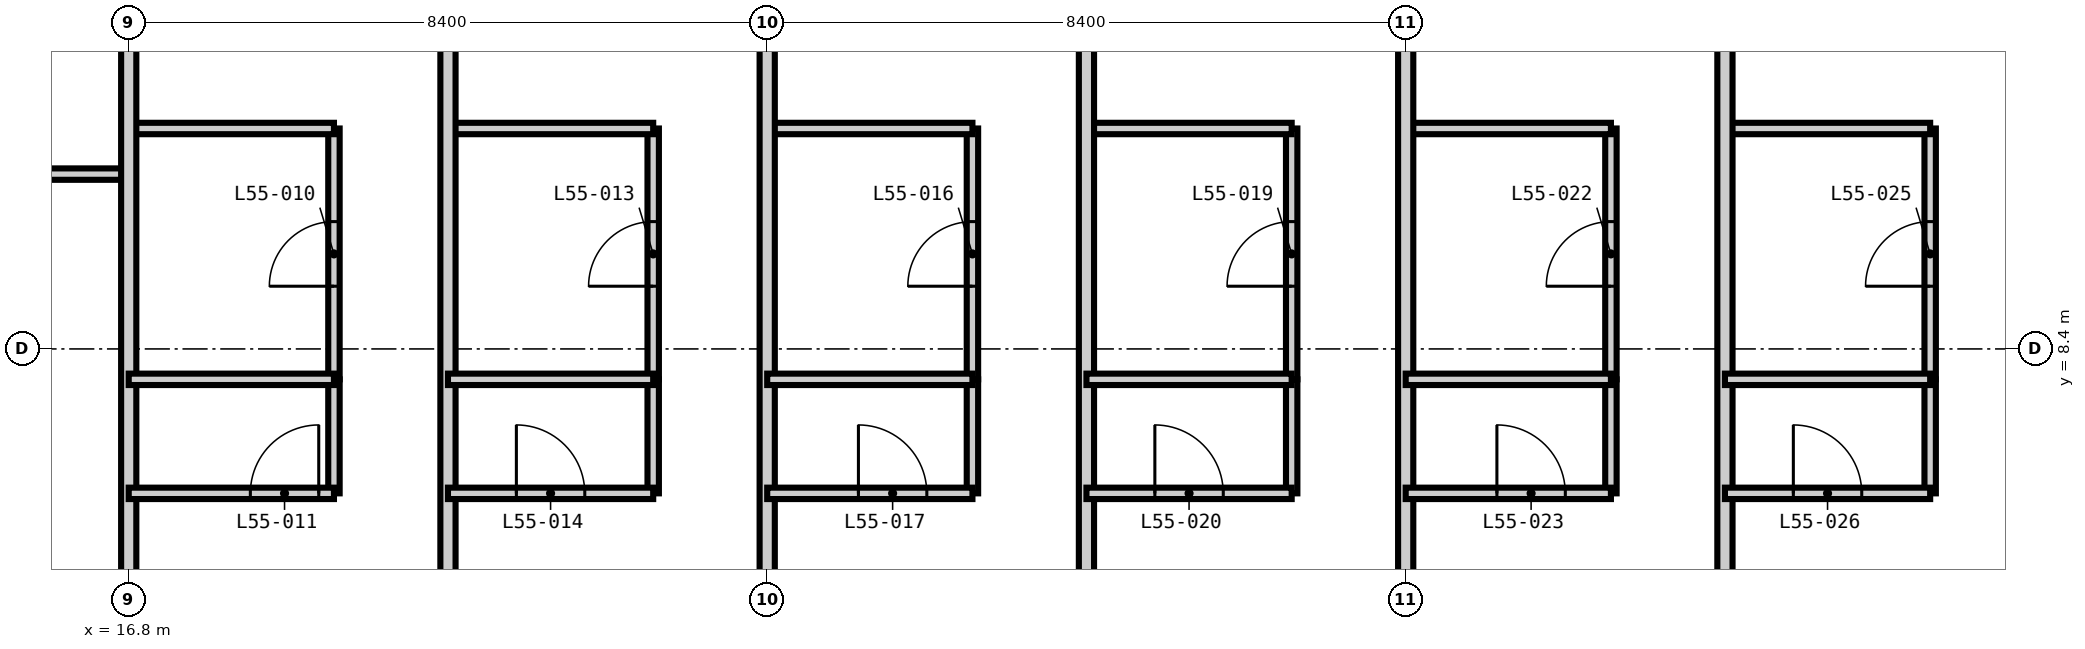
"""IFC4 building model, lengths in metres.
Left out: names, types, materials, properties, quantities, classifications, styles, units other than length and angle.
Written with IfcOpenShell. Run it as: python <this file> out.ifc"""

import sys

from ifc_helpers import new_model, si_unit, direction, frame, frame_2d, origin, place, context, subcontext, project, spatial, rectangle, extrude, element, fill, save


model = new_model("IFC4")
c1 = context("Model", 3, precision=1e-05, world=origin(), true_north=direction((0.0, 1.0)))
c2 = subcontext(c1, "Body", "Model", "MODEL_VIEW")
j1 = project(units=[si_unit("LENGTHUNIT", "METRE"), si_unit("PLANEANGLEUNIT", "RADIAN")], contexts=[c1])
p1 = place(None, origin())
s1 = spatial("IfcSite", under=j1, at=p1, CompositionType="ELEMENT")
p2 = place(p1, origin())
s2 = spatial("IfcBuilding", under=s1, at=p2, CompositionType="ELEMENT")
p3 = place(p2, frame((0.0, 0.0, 213.0)))
s3 = spatial("IfcBuildingStorey", under=s2, at=p3, CompositionType="ELEMENT", Elevation=213.0)
p4 = place(p3, frame((19.5, 8.0, 0.0), z_axis=(0.0, 0.0, 1.0), x_axis=(0.0, 1.0, 0.0)))
e1 = element("IfcWall", 1, at=p4, inside=s3, PredefinedType="PARTITIONING", context=c2, shape_type="SweptSolid", body=[
    extrude(rectangle(XDim=3.3, YDim=0.15, at=frame_2d((1.65, 0.0))), origin(), (0.0, 0.0, 1.0), 3.25),
])
p5 = place(p4, frame((1.225, 0.0, 0.0)))
e2 = element("IfcOpeningElement", 2, at=p5, cuts=e1, PredefinedType="OPENING", context=c2, shape_type="SweptSolid", body=[
    extrude(rectangle(XDim=0.85, YDim=2.1, at=frame_2d((0.425, 1.05))), frame((0.0, 0.085, 0.0), z_axis=(0.0, -1.0, 0.0), x_axis=(1.0, 0.0, 0.0)), (0.0, 0.0, 1.0), 0.17),
])
p6 = place(p3, frame((23.7, 8.0, 0.0), z_axis=(0.0, 0.0, 1.0), x_axis=(0.0, 1.0, 0.0)))
e3 = element("IfcWall", 3, at=p6, inside=s3, PredefinedType="PARTITIONING", context=c2, shape_type="SweptSolid", body=[
    extrude(rectangle(XDim=3.3, YDim=0.15, at=frame_2d((1.65, 0.0))), origin(), (0.0, 0.0, 1.0), 3.25),
])
p7 = place(p6, frame((1.225, 0.0, 0.0)))
e4 = element("IfcOpeningElement", 4, at=p7, cuts=e3, PredefinedType="OPENING", context=c2, shape_type="SweptSolid", body=[
    extrude(rectangle(XDim=0.85, YDim=2.1, at=frame_2d((0.425, 1.05))), frame((0.0, 0.085, 0.0), z_axis=(0.0, -1.0, 0.0), x_axis=(1.0, 0.0, 0.0)), (0.0, 0.0, 1.0), 0.17),
])
p8 = place(p3, frame((27.9, 8.0, 0.0), z_axis=(0.0, 0.0, 1.0), x_axis=(0.0, 1.0, 0.0)))
e5 = element("IfcWall", 5, at=p8, inside=s3, PredefinedType="PARTITIONING", context=c2, shape_type="SweptSolid", body=[
    extrude(rectangle(XDim=3.3, YDim=0.15, at=frame_2d((1.65, 0.0))), origin(), (0.0, 0.0, 1.0), 3.25),
])
p9 = place(p8, frame((1.225, 0.0, 0.0)))
e6 = element("IfcOpeningElement", 6, at=p9, cuts=e5, PredefinedType="OPENING", context=c2, shape_type="SweptSolid", body=[
    extrude(rectangle(XDim=0.85, YDim=2.1, at=frame_2d((0.425, 1.05))), frame((0.0, 0.085, 0.0), z_axis=(0.0, -1.0, 0.0), x_axis=(1.0, 0.0, 0.0)), (0.0, 0.0, 1.0), 0.17),
])
p10 = place(p3, frame((32.1, 8.0, 0.0), z_axis=(0.0, 0.0, 1.0), x_axis=(0.0, 1.0, 0.0)))
e7 = element("IfcWall", 7, at=p10, inside=s3, PredefinedType="PARTITIONING", context=c2, shape_type="SweptSolid", body=[
    extrude(rectangle(XDim=3.3, YDim=0.15, at=frame_2d((1.65, 0.0))), origin(), (0.0, 0.0, 1.0), 3.25),
])
p11 = place(p10, frame((1.225, 0.0, 0.0)))
e8 = element("IfcOpeningElement", 8, at=p11, cuts=e7, PredefinedType="OPENING", context=c2, shape_type="SweptSolid", body=[
    extrude(rectangle(XDim=0.85, YDim=2.1, at=frame_2d((0.425, 1.05))), frame((0.0, 0.085, 0.0), z_axis=(0.0, -1.0, 0.0), x_axis=(1.0, 0.0, 0.0)), (0.0, 0.0, 1.0), 0.17),
])
p12 = place(p3, frame((36.3, 8.0, 0.0), z_axis=(0.0, 0.0, 1.0), x_axis=(0.0, 1.0, 0.0)))
e9 = element("IfcWall", 9, at=p12, inside=s3, PredefinedType="PARTITIONING", context=c2, shape_type="SweptSolid", body=[
    extrude(rectangle(XDim=3.3, YDim=0.15, at=frame_2d((1.65, 0.0))), origin(), (0.0, 0.0, 1.0), 3.25),
])
p13 = place(p12, frame((1.225, 0.0, 0.0)))
e10 = element("IfcOpeningElement", 10, at=p13, cuts=e9, PredefinedType="OPENING", context=c2, shape_type="SweptSolid", body=[
    extrude(rectangle(XDim=0.85, YDim=2.1, at=frame_2d((0.425, 1.05))), frame((0.0, 0.085, 0.0), z_axis=(0.0, -1.0, 0.0), x_axis=(1.0, 0.0, 0.0)), (0.0, 0.0, 1.0), 0.17),
])
p14 = place(p3, frame((40.5, 8.0, 0.0), z_axis=(0.0, 0.0, 1.0), x_axis=(0.0, 1.0, 0.0)))
e11 = element("IfcWall", 11, at=p14, inside=s3, PredefinedType="PARTITIONING", context=c2, shape_type="SweptSolid", body=[
    extrude(rectangle(XDim=3.3, YDim=0.15, at=frame_2d((1.65, 0.0))), origin(), (0.0, 0.0, 1.0), 3.25),
])
p15 = place(p14, frame((1.225, 0.0, 0.0)))
e12 = element("IfcOpeningElement", 12, at=p15, cuts=e11, PredefinedType="OPENING", context=c2, shape_type="SweptSolid", body=[
    extrude(rectangle(XDim=0.85, YDim=2.1, at=frame_2d((0.425, 1.05))), frame((0.0, 0.085, 0.0), z_axis=(0.0, -1.0, 0.0), x_axis=(1.0, 0.0, 0.0)), (0.0, 0.0, 1.0), 0.17),
])
p16 = place(p3, frame((13.7, 10.7, 0.0), z_axis=(0.0, 0.0, 1.0), x_axis=(1.0, 0.0, 0.0)))
e13 = element("IfcWall", 13, at=p16, inside=s3, PredefinedType="PARTITIONING", context=c2, shape_type="SweptSolid", body=[
    extrude(rectangle(XDim=3.1, YDim=0.15, at=frame_2d((1.55, 0.0))), origin(), (0.0, 0.0, 1.0), 3.25),
])
p17 = place(p16, frame((1.125, 0.0, 0.0)))
e14 = element("IfcOpeningElement", 14, at=p17, cuts=e13, PredefinedType="OPENING", context=c2, shape_type="SweptSolid", body=[
    extrude(rectangle(XDim=0.85, YDim=2.1, at=frame_2d((0.425, 1.05))), frame((0.0, 0.085, 0.0), z_axis=(0.0, -1.0, 0.0), x_axis=(1.0, 0.0, 0.0)), (0.0, 0.0, 1.0), 0.17),
])
for number, where, z_axis, x_axis in (
    (15, (16.8, 11.3, 0.0), (0.0, 0.0, 1.0), (1.0, 0.0, 0.0)),
    (16, (21.0, 11.3, 0.0), (0.0, 0.0, 1.0), (1.0, 0.0, 0.0)),
    (17, (25.2, 11.3, 0.0), (0.0, 0.0, 1.0), (1.0, 0.0, 0.0)),
):
    element("IfcWall", number, at=place(p3, frame(where, z_axis=z_axis, x_axis=x_axis)), inside=s3, PredefinedType="PARTITIONING", context=c2, shape_type="SweptSolid", body=[
        extrude(rectangle(XDim=2.7, YDim=0.15, at=frame_2d((1.35, 0.0))), origin(), (0.0, 0.0, 1.0), 3.25),
    ])
p18 = place(p3, frame((29.4, 11.3, 0.0), z_axis=(0.0, 0.0, 1.0), x_axis=(1.0, 0.0, 0.0)))
e18 = element("IfcWall", 18, at=p18, inside=s3, PredefinedType="PARTITIONING", context=c2, shape_type="SweptSolid", body=[
    extrude(rectangle(XDim=2.7, YDim=0.15, at=frame_2d((1.35, 0.0))), origin(), (0.0, 0.0, 1.0), 3.25),
])
for number, where, z_axis, x_axis in (
    (19, (33.6, 11.3, 0.0), (0.0, 0.0, 1.0), (1.0, 0.0, 0.0)),
    (20, (37.8, 11.3, 0.0), (0.0, 0.0, 1.0), (1.0, 0.0, 0.0)),
):
    element("IfcWall", number, at=place(p3, frame(where, z_axis=z_axis, x_axis=x_axis)), inside=s3, PredefinedType="PARTITIONING", context=c2, shape_type="SweptSolid", body=[
        extrude(rectangle(XDim=2.7, YDim=0.15, at=frame_2d((1.35, 0.0))), origin(), (0.0, 0.0, 1.0), 3.25),
    ])
for number, where, z_axis, x_axis in (
    (21, (16.8, 4.182, 0.0), (0.0, 0.0, 1.0), (0.0, 1.0, 0.0)),
    (22, (21.0, 4.182, 0.0), (0.0, 0.0, 1.0), (0.0, 1.0, 0.0)),
    (23, (25.2, 4.182, 0.0), (0.0, 0.0, 1.0), (0.0, 1.0, 0.0)),
    (24, (29.4, 4.182, 0.0), (0.0, 0.0, 1.0), (0.0, 1.0, 0.0)),
    (25, (33.6, 4.182, 0.0), (0.0, 0.0, 1.0), (0.0, 1.0, 0.0)),
    (26, (37.8, 4.182, 0.0), (0.0, 0.0, 1.0), (0.0, 1.0, 0.0)),
):
    element("IfcWall", number, at=place(p3, frame(where, z_axis=z_axis, x_axis=x_axis)), inside=s3, PredefinedType="PARTITIONING", context=c2, shape_type="SweptSolid", body=[
        extrude(rectangle(XDim=9.518, YDim=0.2, at=frame_2d((4.759, 0.0))), origin(), (0.0, 0.0, 1.0), 3.25),
    ])
for number, where, z_axis, x_axis in (
    (27, (19.5, 6.5, 0.0), (0.0, 0.0, 1.0), (0.0, 1.0, 0.0)),
    (28, (23.7, 6.5, 0.0), (0.0, 0.0, 1.0), (0.0, 1.0, 0.0)),
    (29, (27.9, 6.5, 0.0), (0.0, 0.0, 1.0), (0.0, 1.0, 0.0)),
    (30, (32.1, 6.5, 0.0), (0.0, 0.0, 1.0), (0.0, 1.0, 0.0)),
    (31, (36.3, 6.5, 0.0), (0.0, 0.0, 1.0), (0.0, 1.0, 0.0)),
    (32, (40.5, 6.5, 0.0), (0.0, 0.0, 1.0), (0.0, 1.0, 0.0)),
):
    element("IfcWall", number, at=place(p3, frame(where, z_axis=z_axis, x_axis=x_axis)), inside=s3, PredefinedType="PARTITIONING", context=c2, shape_type="SweptSolid", body=[
        extrude(rectangle(XDim=1.5, YDim=0.15, at=frame_2d((0.75, 0.0))), origin(), (0.0, 0.0, 1.0), 3.25),
    ])
p19 = place(p3, frame((16.8, 6.5, 0.0), z_axis=(0.0, 0.0, 1.0), x_axis=(1.0, 0.0, 0.0)))
e33 = element("IfcWall", 33, at=p19, inside=s3, PredefinedType="PARTITIONING", context=c2, shape_type="SweptSolid", body=[
    extrude(rectangle(XDim=2.7, YDim=0.15, at=frame_2d((1.35, 0.0))), origin(), (0.0, 0.0, 1.0), 3.25),
])
p20 = place(p19, frame((1.6, 0.0, 0.0)))
e34 = element("IfcOpeningElement", 34, at=p20, cuts=e33, PredefinedType="OPENING", context=c2, shape_type="SweptSolid", body=[
    extrude(rectangle(XDim=0.9, YDim=2.1, at=frame_2d((0.45, 1.05))), frame((0.0, 0.085, 0.0), z_axis=(0.0, -1.0, 0.0), x_axis=(1.0, 0.0, 0.0)), (0.0, 0.0, 1.0), 0.17),
])
p21 = place(p3, frame((21.0, 6.5, 0.0), z_axis=(0.0, 0.0, 1.0), x_axis=(1.0, 0.0, 0.0)))
e35 = element("IfcWall", 35, at=p21, inside=s3, PredefinedType="PARTITIONING", context=c2, shape_type="SweptSolid", body=[
    extrude(rectangle(XDim=2.7, YDim=0.15, at=frame_2d((1.35, 0.0))), origin(), (0.0, 0.0, 1.0), 3.25),
])
p22 = place(p21, frame((0.9, 0.0, 0.0)))
e36 = element("IfcOpeningElement", 36, at=p22, cuts=e35, PredefinedType="OPENING", context=c2, shape_type="SweptSolid", body=[
    extrude(rectangle(XDim=0.9, YDim=2.1, at=frame_2d((0.45, 1.05))), frame((0.0, 0.085, 0.0), z_axis=(0.0, -1.0, 0.0), x_axis=(1.0, 0.0, 0.0)), (0.0, 0.0, 1.0), 0.17),
])
p23 = place(p3, frame((25.2, 6.5, 0.0), z_axis=(0.0, 0.0, 1.0), x_axis=(1.0, 0.0, 0.0)))
e37 = element("IfcWall", 37, at=p23, inside=s3, PredefinedType="PARTITIONING", context=c2, shape_type="SweptSolid", body=[
    extrude(rectangle(XDim=2.7, YDim=0.15, at=frame_2d((1.35, 0.0))), origin(), (0.0, 0.0, 1.0), 3.25),
])
p24 = place(p23, frame((1.2, 0.0, 0.0)))
e38 = element("IfcOpeningElement", 38, at=p24, cuts=e37, PredefinedType="OPENING", context=c2, shape_type="SweptSolid", body=[
    extrude(rectangle(XDim=0.9, YDim=2.1, at=frame_2d((0.45, 1.05))), frame((0.0, 0.085, 0.0), z_axis=(0.0, -1.0, 0.0), x_axis=(1.0, 0.0, 0.0)), (0.0, 0.0, 1.0), 0.17),
])
p25 = place(p3, frame((29.4, 6.5, 0.0), z_axis=(0.0, 0.0, 1.0), x_axis=(1.0, 0.0, 0.0)))
e39 = element("IfcWall", 39, at=p25, inside=s3, PredefinedType="PARTITIONING", context=c2, shape_type="SweptSolid", body=[
    extrude(rectangle(XDim=2.7, YDim=0.15, at=frame_2d((1.35, 0.0))), origin(), (0.0, 0.0, 1.0), 3.25),
])
p26 = place(p25, frame((0.9, 0.0, 0.0)))
e40 = element("IfcOpeningElement", 40, at=p26, cuts=e39, PredefinedType="OPENING", context=c2, shape_type="SweptSolid", body=[
    extrude(rectangle(XDim=0.9, YDim=2.1, at=frame_2d((0.45, 1.05))), frame((0.0, 0.085, 0.0), z_axis=(0.0, -1.0, 0.0), x_axis=(1.0, 0.0, 0.0)), (0.0, 0.0, 1.0), 0.17),
])
p27 = place(p3, frame((33.6, 6.5, 0.0), z_axis=(0.0, 0.0, 1.0), x_axis=(1.0, 0.0, 0.0)))
e41 = element("IfcWall", 41, at=p27, inside=s3, PredefinedType="PARTITIONING", context=c2, shape_type="SweptSolid", body=[
    extrude(rectangle(XDim=2.7, YDim=0.15, at=frame_2d((1.35, 0.0))), origin(), (0.0, 0.0, 1.0), 3.25),
])
p28 = place(p27, frame((1.2, 0.0, 0.0)))
e42 = element("IfcOpeningElement", 42, at=p28, cuts=e41, PredefinedType="OPENING", context=c2, shape_type="SweptSolid", body=[
    extrude(rectangle(XDim=0.9, YDim=2.1, at=frame_2d((0.45, 1.05))), frame((0.0, 0.085, 0.0), z_axis=(0.0, -1.0, 0.0), x_axis=(1.0, 0.0, 0.0)), (0.0, 0.0, 1.0), 0.17),
])
p29 = place(p3, frame((37.8, 6.5, 0.0), z_axis=(0.0, 0.0, 1.0), x_axis=(1.0, 0.0, 0.0)))
e43 = element("IfcWall", 43, at=p29, inside=s3, PredefinedType="PARTITIONING", context=c2, shape_type="SweptSolid", body=[
    extrude(rectangle(XDim=2.7, YDim=0.15, at=frame_2d((1.35, 0.0))), origin(), (0.0, 0.0, 1.0), 3.25),
])
p30 = place(p29, frame((0.9, 0.0, 0.0)))
e44 = element("IfcOpeningElement", 44, at=p30, cuts=e43, PredefinedType="OPENING", context=c2, shape_type="SweptSolid", body=[
    extrude(rectangle(XDim=0.9, YDim=2.1, at=frame_2d((0.45, 1.05))), frame((0.0, 0.085, 0.0), z_axis=(0.0, -1.0, 0.0), x_axis=(1.0, 0.0, 0.0)), (0.0, 0.0, 1.0), 0.17),
])
for number, where, z_axis, x_axis in (
    (45, (16.8, 8.0, 0.0), (0.0, 0.0, 1.0), (1.0, 0.0, 0.0)),
    (46, (21.0, 8.0, 0.0), (0.0, 0.0, 1.0), (1.0, 0.0, 0.0)),
    (47, (25.2, 8.0, 0.0), (0.0, 0.0, 1.0), (1.0, 0.0, 0.0)),
):
    element("IfcWall", number, at=place(p3, frame(where, z_axis=z_axis, x_axis=x_axis)), inside=s3, PredefinedType="PARTITIONING", context=c2, shape_type="SweptSolid", body=[
        extrude(rectangle(XDim=2.7, YDim=0.15, at=frame_2d((1.35, 0.0))), origin(), (0.0, 0.0, 1.0), 3.25),
    ])
p31 = place(p3, frame((29.4, 8.0, 0.0), z_axis=(0.0, 0.0, 1.0), x_axis=(1.0, 0.0, 0.0)))
e48 = element("IfcWall", 48, at=p31, inside=s3, PredefinedType="PARTITIONING", context=c2, shape_type="SweptSolid", body=[
    extrude(rectangle(XDim=2.7, YDim=0.15, at=frame_2d((1.35, 0.0))), origin(), (0.0, 0.0, 1.0), 3.25),
])
for number, where, z_axis, x_axis in (
    (49, (33.6, 8.0, 0.0), (0.0, 0.0, 1.0), (1.0, 0.0, 0.0)),
    (50, (37.8, 8.0, 0.0), (0.0, 0.0, 1.0), (1.0, 0.0, 0.0)),
):
    element("IfcWall", number, at=place(p3, frame(where, z_axis=z_axis, x_axis=x_axis)), inside=s3, PredefinedType="PARTITIONING", context=c2, shape_type="SweptSolid", body=[
        extrude(rectangle(XDim=2.7, YDim=0.15, at=frame_2d((1.35, 0.0))), origin(), (0.0, 0.0, 1.0), 3.25),
    ])
p32 = place(p5, origin())
e51 = element("IfcDoor", 51, at=p32, inside=s3, OperationType="SINGLE_SWING_LEFT", PredefinedType="DOOR", context=c2, shape_type="SweptSolid", body=[
    extrude(rectangle(XDim=0.85, YDim=2.1, at=frame_2d((0.425, 1.05))), frame((0.0, 0.025, 0.0), z_axis=(0.0, -1.0, 0.0), x_axis=(1.0, 0.0, 0.0)), (0.0, 0.0, 1.0), 0.05),
])
fill(e2, e51)
p33 = place(p20, origin())
e52 = element("IfcDoor", 52, at=p33, inside=s3, OperationType="SINGLE_SWING_RIGHT", PredefinedType="DOOR", context=c2, shape_type="SweptSolid", body=[
    extrude(rectangle(XDim=0.9, YDim=2.1, at=frame_2d((0.45, 1.05))), frame((0.0, 0.025, 0.0), z_axis=(0.0, -1.0, 0.0), x_axis=(1.0, 0.0, 0.0)), (0.0, 0.0, 1.0), 0.05),
])
fill(e34, e52)
p34 = place(p7, origin())
e53 = element("IfcDoor", 53, at=p34, inside=s3, OperationType="SINGLE_SWING_LEFT", PredefinedType="DOOR", context=c2, shape_type="SweptSolid", body=[
    extrude(rectangle(XDim=0.85, YDim=2.1, at=frame_2d((0.425, 1.05))), frame((0.0, 0.025, 0.0), z_axis=(0.0, -1.0, 0.0), x_axis=(1.0, 0.0, 0.0)), (0.0, 0.0, 1.0), 0.05),
])
fill(e4, e53)
p35 = place(p22, origin())
e54 = element("IfcDoor", 54, at=p35, inside=s3, OperationType="SINGLE_SWING_LEFT", PredefinedType="DOOR", context=c2, shape_type="SweptSolid", body=[
    extrude(rectangle(XDim=0.9, YDim=2.1, at=frame_2d((0.45, 1.05))), frame((0.0, 0.025, 0.0), z_axis=(0.0, -1.0, 0.0), x_axis=(1.0, 0.0, 0.0)), (0.0, 0.0, 1.0), 0.05),
])
fill(e36, e54)
p36 = place(p9, origin())
e55 = element("IfcDoor", 55, at=p36, inside=s3, OperationType="SINGLE_SWING_LEFT", PredefinedType="DOOR", context=c2, shape_type="SweptSolid", body=[
    extrude(rectangle(XDim=0.85, YDim=2.1, at=frame_2d((0.425, 1.05))), frame((0.0, 0.025, 0.0), z_axis=(0.0, -1.0, 0.0), x_axis=(1.0, 0.0, 0.0)), (0.0, 0.0, 1.0), 0.05),
])
fill(e6, e55)
p37 = place(p24, origin())
e56 = element("IfcDoor", 56, at=p37, inside=s3, OperationType="SINGLE_SWING_LEFT", PredefinedType="DOOR", context=c2, shape_type="SweptSolid", body=[
    extrude(rectangle(XDim=0.9, YDim=2.1, at=frame_2d((0.45, 1.05))), frame((0.0, 0.025, 0.0), z_axis=(0.0, -1.0, 0.0), x_axis=(1.0, 0.0, 0.0)), (0.0, 0.0, 1.0), 0.05),
])
fill(e38, e56)
p38 = place(p11, origin())
e57 = element("IfcDoor", 57, at=p38, inside=s3, OperationType="SINGLE_SWING_LEFT", PredefinedType="DOOR", context=c2, shape_type="SweptSolid", body=[
    extrude(rectangle(XDim=0.85, YDim=2.1, at=frame_2d((0.425, 1.05))), frame((0.0, 0.025, 0.0), z_axis=(0.0, -1.0, 0.0), x_axis=(1.0, 0.0, 0.0)), (0.0, 0.0, 1.0), 0.05),
])
fill(e8, e57)
p39 = place(p26, origin())
e58 = element("IfcDoor", 58, at=p39, inside=s3, OperationType="SINGLE_SWING_LEFT", PredefinedType="DOOR", context=c2, shape_type="SweptSolid", body=[
    extrude(rectangle(XDim=0.9, YDim=2.1, at=frame_2d((0.45, 1.05))), frame((0.0, 0.025, 0.0), z_axis=(0.0, -1.0, 0.0), x_axis=(1.0, 0.0, 0.0)), (0.0, 0.0, 1.0), 0.05),
])
fill(e40, e58)
p40 = place(p13, origin())
e59 = element("IfcDoor", 59, at=p40, inside=s3, OperationType="SINGLE_SWING_LEFT", PredefinedType="DOOR", context=c2, shape_type="SweptSolid", body=[
    extrude(rectangle(XDim=0.85, YDim=2.1, at=frame_2d((0.425, 1.05))), frame((0.0, 0.025, 0.0), z_axis=(0.0, -1.0, 0.0), x_axis=(1.0, 0.0, 0.0)), (0.0, 0.0, 1.0), 0.05),
])
fill(e10, e59)
p41 = place(p28, origin())
e60 = element("IfcDoor", 60, at=p41, inside=s3, OperationType="SINGLE_SWING_LEFT", PredefinedType="DOOR", context=c2, shape_type="SweptSolid", body=[
    extrude(rectangle(XDim=0.9, YDim=2.1, at=frame_2d((0.45, 1.05))), frame((0.0, 0.025, 0.0), z_axis=(0.0, -1.0, 0.0), x_axis=(1.0, 0.0, 0.0)), (0.0, 0.0, 1.0), 0.05),
])
fill(e42, e60)
p42 = place(p15, origin())
e61 = element("IfcDoor", 61, at=p42, inside=s3, OperationType="SINGLE_SWING_LEFT", PredefinedType="DOOR", context=c2, shape_type="SweptSolid", body=[
    extrude(rectangle(XDim=0.85, YDim=2.1, at=frame_2d((0.425, 1.05))), frame((0.0, 0.025, 0.0), z_axis=(0.0, -1.0, 0.0), x_axis=(1.0, 0.0, 0.0)), (0.0, 0.0, 1.0), 0.05),
])
fill(e12, e61)
p43 = place(p30, origin())
e62 = element("IfcDoor", 62, at=p43, inside=s3, OperationType="SINGLE_SWING_LEFT", PredefinedType="DOOR", context=c2, shape_type="SweptSolid", body=[
    extrude(rectangle(XDim=0.9, YDim=2.1, at=frame_2d((0.45, 1.05))), frame((0.0, 0.025, 0.0), z_axis=(0.0, -1.0, 0.0), x_axis=(1.0, 0.0, 0.0)), (0.0, 0.0, 1.0), 0.05),
])
fill(e44, e62)
save(model, sys.argv[1])
